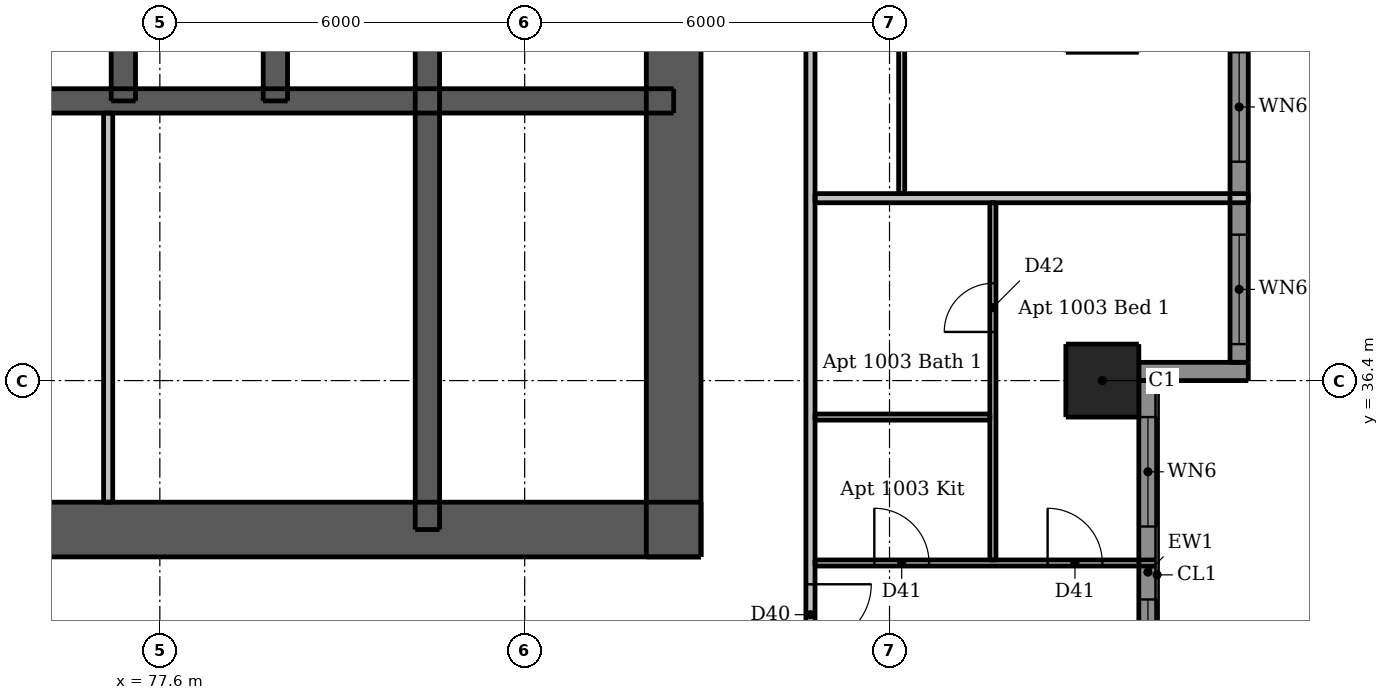
"""IFC4 building model, lengths in metres.
Left out: names, types, materials, properties, quantities, classifications, styles, units other than length and angle.
Written with IfcOpenShell. Run it as: python <this file> out.ifc"""

import sys

from ifc_helpers import new_model, si_unit, direction, frame, frame_2d, origin, origin_2d, place, context, subcontext, project, spatial, rectangle, extrude, element, fill, save


model = new_model("IFC4")
c1 = context("Model", 3, precision=1e-05, world=origin(), true_north=direction((0.0, 1.0)))
c2 = subcontext(c1, "Body", "Model", "MODEL_VIEW")
j1 = project(units=[si_unit("LENGTHUNIT", "METRE"), si_unit("PLANEANGLEUNIT", "RADIAN")], contexts=[c1])
p1 = place(None, origin())
s1 = spatial("IfcSite", under=j1, at=p1, CompositionType="ELEMENT")
p2 = place(p1, origin())
s2 = spatial("IfcBuilding", under=s1, at=p2, CompositionType="ELEMENT")
p3 = place(p2, frame((0.0, 0.0, 40.0)))
s3 = spatial("IfcBuildingStorey", under=s2, at=p3, CompositionType="ELEMENT", Elevation=40.0)
p4 = place(p3, frame((62.5, 33.95, 0.0), z_axis=(0.0, 0.0, 1.0), x_axis=(1.0, 0.0, 0.0)))
e1 = element("IfcWall", 1, at=p4, inside=s3, PredefinedType="SHEAR", context=c2, shape_type="SweptSolid", body=[
    extrude(rectangle(XDim=24.0, YDim=0.9, at=frame_2d((12.0, 0.0))), origin(), (0.0, 0.0, 1.0), 3.05),
])
p5 = place(p4, frame((2.05, 0.0, 0.0)))
e2 = element("IfcOpeningElement", 2, at=p5, cuts=e1, PredefinedType="OPENING", context=c2, shape_type="SweptSolid", body=[
    extrude(rectangle(XDim=1.1, YDim=2.1, at=frame_2d((0.55, 1.05))), frame((0.0, 0.46, 0.0), z_axis=(0.0, -1.0, 0.0), x_axis=(1.0, 0.0, 0.0)), (0.0, 0.0, 1.0), 0.92),
])
p6 = place(p4, frame((20.85, 0.0, 0.0)))
e3 = element("IfcOpeningElement", 3, at=p6, cuts=e1, PredefinedType="OPENING", context=c2, shape_type="SweptSolid", body=[
    extrude(rectangle(XDim=1.1, YDim=2.1, at=frame_2d((0.55, 1.05))), frame((0.0, 0.46, 0.0), z_axis=(0.0, -1.0, 0.0), x_axis=(1.0, 0.0, 0.0)), (0.0, 0.0, 1.0), 0.92),
])
p7 = place(p4, frame((8.0, 0.0, 0.0)))
e4 = element("IfcOpeningElement", 4, at=p7, cuts=e1, PredefinedType="OPENING", context=c2, shape_type="SweptSolid", body=[
    extrude(rectangle(XDim=1.1, YDim=2.1, at=frame_2d((0.55, 1.05))), frame((0.0, 0.46, 0.0), z_axis=(0.0, -1.0, 0.0), x_axis=(1.0, 0.0, 0.0)), (0.0, 0.0, 1.0), 0.92),
])
p8 = place(p4, frame((16.363, 0.0, 0.0)))
e5 = element("IfcOpeningElement", 5, at=p8, cuts=e1, PredefinedType="OPENING", context=c2, shape_type="SweptSolid", body=[
    extrude(rectangle(XDim=0.9, YDim=2.1, at=frame_2d((0.45, 1.05))), frame((0.0, 0.46, 0.0), z_axis=(0.0, -1.0, 0.0), x_axis=(1.0, 0.0, 0.0)), (0.0, 0.0, 1.0), 0.92),
])
p9 = place(p3, frame((86.05, 33.5, 0.0), z_axis=(0.0, 0.0, 1.0), x_axis=(0.0, 1.0, 0.0)))
e6 = element("IfcWall", 6, at=p9, inside=s3, PredefinedType="SHEAR", context=c2, shape_type="SweptSolid", body=[
    extrude(rectangle(XDim=24.0, YDim=0.9, at=frame_2d((12.0, 0.0))), origin(), (0.0, 0.0, 1.0), 3.05),
])
p10 = place(p9, frame((11.2, 0.0, 0.0)))
e7 = element("IfcOpeningElement", 7, at=p10, cuts=e6, PredefinedType="OPENING", context=c2, shape_type="SweptSolid", body=[
    extrude(rectangle(XDim=1.6, YDim=2.1, at=frame_2d((0.8, 1.05))), frame((0.0, 0.46, 0.0), z_axis=(0.0, -1.0, 0.0), x_axis=(1.0, 0.0, 0.0)), (0.0, 0.0, 1.0), 0.92),
])
p11 = place(p3, frame((62.95, 41.0, 0.0), z_axis=(0.0, 0.0, 1.0), x_axis=(1.0, 0.0, 0.0)))
e8 = element("IfcWall", 8, at=p11, inside=s3, PredefinedType="SHEAR", context=c2, shape_type="SweptSolid", body=[
    extrude(rectangle(XDim=23.1, YDim=0.4, at=frame_2d((11.55, 0.0))), origin(), (0.0, 0.0, 1.0), 3.05),
])
p12 = place(p3, frame((82.0, 33.95, 0.0), z_axis=(0.0, 0.0, 1.0), x_axis=(0.0, 1.0, 0.0)))
e9 = element("IfcWall", 9, at=p12, inside=s3, PredefinedType="SHEAR", context=c2, shape_type="SweptSolid", body=[
    extrude(rectangle(XDim=9.95, YDim=0.4, at=frame_2d((4.975, 0.0))), origin(), (0.0, 0.0, 1.0), 3.05),
])
for number, where, z_axis, x_axis in (
    (10, (77.0, 41.0, 0.0), (0.0, 0.0, 1.0), (0.0, 1.0, 0.0)),
    (11, (79.5, 41.0, 0.0), (0.0, 0.0, 1.0), (0.0, 1.0, 0.0)),
):
    element("IfcWall", number, at=place(p3, frame(where, z_axis=z_axis, x_axis=x_axis)), inside=s3, PredefinedType="SHEAR", context=c2, shape_type="SweptSolid", body=[
        extrude(rectangle(XDim=2.9, YDim=0.4, at=frame_2d((1.45, 0.0))), origin(), (0.0, 0.0, 1.0), 3.05),
    ])
for number, where, z_axis, x_axis in (
    (12, (93.1, 36.4, 0.0), (0.0, 0.0, 1.0), (1.0, 0.0, 0.0)),
    (13, (93.1, 42.4, 0.0), (0.0, 0.0, 1.0), (1.0, 0.0, 0.0)),
):
    element("IfcColumn", number, at=place(p3, frame(where, z_axis=z_axis, x_axis=x_axis)), inside=s3, PredefinedType="COLUMN", context=c2, shape_type="SweptSolid", body=[
        extrude(rectangle(XDim=1.2, YDim=1.2, at=origin_2d()), origin(), (0.0, 0.0, 1.0), 3.05),
    ])
p13 = place(p3, frame((93.7, 36.55, 0.0), z_axis=(0.0, 0.0, 1.0), x_axis=(1.0, 0.0, 0.0)))
e14 = element("IfcWall", 14, at=p13, inside=s3, PredefinedType="SOLIDWALL", context=c2, shape_type="SweptSolid", body=[
    extrude(rectangle(XDim=1.8, YDim=0.3, at=frame_2d((0.9, 0.0))), origin(), (0.0, 0.0, 1.0), 3.05),
])
p14 = place(p3, frame((93.85, 30.1, 0.0), z_axis=(0.0, 0.0, 1.0), x_axis=(0.0, 1.0, 0.0)))
e15 = element("IfcWall", 15, at=p14, inside=s3, PredefinedType="SOLIDWALL", context=c2, shape_type="SweptSolid", body=[
    extrude(rectangle(XDim=6.3, YDim=0.3, at=frame_2d((3.15, 0.0))), origin(), (0.0, 0.0, 1.0), 3.05),
])
p15 = place(p14, frame((0.9, 0.0, 0.15)))
e16 = element("IfcOpeningElement", 16, at=p15, cuts=e15, PredefinedType="OPENING", context=c2, shape_type="SweptSolid", body=[
    extrude(rectangle(XDim=1.8, YDim=2.1, at=frame_2d((0.9, 1.05))), frame((0.0, 0.16, 0.0), z_axis=(0.0, -1.0, 0.0), x_axis=(1.0, 0.0, 0.0)), (0.0, 0.0, 1.0), 0.32),
])
p16 = place(p14, frame((3.9, 0.0, 0.15)))
e17 = element("IfcOpeningElement", 17, at=p16, cuts=e15, PredefinedType="OPENING", context=c2, shape_type="SweptSolid", body=[
    extrude(rectangle(XDim=1.8, YDim=2.1, at=frame_2d((0.9, 1.05))), frame((0.0, 0.16, 0.0), z_axis=(0.0, -1.0, 0.0), x_axis=(1.0, 0.0, 0.0)), (0.0, 0.0, 1.0), 0.32),
])
p17 = place(p3, frame((95.35, 36.7, 0.0), z_axis=(0.0, 0.0, 1.0), x_axis=(0.0, 1.0, 0.0)))
e18 = element("IfcWall", 18, at=p17, inside=s3, PredefinedType="SOLIDWALL", context=c2, shape_type="SweptSolid", body=[
    extrude(rectangle(XDim=5.61, YDim=0.3, at=frame_2d((2.805, 0.0))), origin(), (0.0, 0.0, 1.0), 3.05),
])
p18 = place(p17, frame((0.3, 0.0, 0.15)))
e19 = element("IfcOpeningElement", 19, at=p18, cuts=e18, PredefinedType="OPENING", context=c2, shape_type="SweptSolid", body=[
    extrude(rectangle(XDim=1.8, YDim=2.1, at=frame_2d((0.9, 1.05))), frame((0.0, 0.16, 0.0), z_axis=(0.0, -1.0, 0.0), x_axis=(1.0, 0.0, 0.0)), (0.0, 0.0, 1.0), 0.32),
])
p19 = place(p17, frame((3.3, 0.0, 0.15)))
e20 = element("IfcOpeningElement", 20, at=p19, cuts=e18, PredefinedType="OPENING", context=c2, shape_type="SweptSolid", body=[
    extrude(rectangle(XDim=1.8, YDim=2.1, at=frame_2d((0.9, 1.05))), frame((0.0, 0.16, 0.0), z_axis=(0.0, -1.0, 0.0), x_axis=(1.0, 0.0, 0.0)), (0.0, 0.0, 1.0), 0.32),
])
p20 = place(p3, frame((76.75, 34.4, 0.0), z_axis=(0.0, 0.0, 1.0), x_axis=(0.0, 1.0, 0.0)))
e21 = element("IfcWall", 21, at=p20, inside=s3, PredefinedType="PLUMBINGWALL", context=c2, shape_type="SweptSolid", body=[
    extrude(rectangle(XDim=6.4, YDim=0.15, at=frame_2d((3.2, 0.0))), origin(), (0.0, 0.0, 1.0), 3.05),
])
p21 = place(p3, frame((89.8, 59.35, 0.0), z_axis=(0.0, 0.0, 1.0), x_axis=(0.0, -1.0, 0.0)))
e22 = element("IfcWall", 22, at=p21, inside=s3, PredefinedType="PARTITIONING", context=c2, shape_type="SweptSolid", body=[
    extrude(rectangle(XDim=19.875, YDim=0.1, at=frame_2d((9.938, 0.0))), origin(), (0.0, 0.0, 1.0), 3.05),
])
p22 = place(p21, frame((15.0, 0.0, 0.0)))
e23 = element("IfcOpeningElement", 23, at=p22, cuts=e22, PredefinedType="OPENING", context=c2, shape_type="SweptSolid", body=[
    extrude(rectangle(XDim=0.9, YDim=2.1, at=frame_2d((0.45, 1.05))), frame((0.0, 0.06, 0.0), z_axis=(0.0, -1.0, 0.0), x_axis=(1.0, 0.0, 0.0)), (0.0, 0.0, 1.0), 0.12),
])
p23 = place(p21, frame((9.0, 0.0, 0.0)))
e24 = element("IfcOpeningElement", 24, at=p23, cuts=e22, PredefinedType="OPENING", context=c2, shape_type="SweptSolid", body=[
    extrude(rectangle(XDim=0.9, YDim=2.1, at=frame_2d((0.45, 1.05))), frame((0.0, 0.06, 0.0), z_axis=(0.0, -1.0, 0.0), x_axis=(1.0, 0.0, 0.0)), (0.0, 0.0, 1.0), 0.12),
])
p24 = place(p21, frame((6.0, 0.0, 0.0)))
e25 = element("IfcOpeningElement", 25, at=p24, cuts=e22, PredefinedType="OPENING", context=c2, shape_type="SweptSolid", body=[
    extrude(rectangle(XDim=0.9, YDim=2.1, at=frame_2d((0.45, 1.05))), frame((0.0, 0.06, 0.0), z_axis=(0.0, -1.0, 0.0), x_axis=(1.0, 0.0, 0.0)), (0.0, 0.0, 1.0), 0.12),
])
p25 = place(p21, frame((0.85, 0.0, 0.0)))
e26 = element("IfcOpeningElement", 26, at=p25, cuts=e22, PredefinedType="OPENING", context=c2, shape_type="SweptSolid", body=[
    extrude(rectangle(XDim=0.9, YDim=2.1, at=frame_2d((0.45, 1.05))), frame((0.0, 0.06, 0.0), z_axis=(0.0, -1.0, 0.0), x_axis=(1.0, 0.0, 0.0)), (0.0, 0.0, 1.0), 0.12),
])
p26 = place(p21, frame((3.35, 0.0, 0.0)))
e27 = element("IfcOpeningElement", 27, at=p26, cuts=e22, PredefinedType="OPENING", context=c2, shape_type="SweptSolid", body=[
    extrude(rectangle(XDim=0.8, YDim=2.1, at=frame_2d((0.4, 1.05))), frame((0.0, 0.06, 0.0), z_axis=(0.0, -1.0, 0.0), x_axis=(1.0, 0.0, 0.0)), (0.0, 0.0, 1.0), 0.12),
])
p27 = place(p3, frame((91.3, 33.45, 0.0), z_axis=(0.0, 0.0, 1.0), x_axis=(0.0, 1.0, 0.0)))
e28 = element("IfcWall", 28, at=p27, inside=s3, PredefinedType="PARTITIONING", context=c2, shape_type="SweptSolid", body=[
    extrude(rectangle(XDim=5.875, YDim=0.1, at=frame_2d((2.938, 0.0))), origin(), (0.0, 0.0, 1.0), 3.05),
])
p28 = place(p27, frame((3.75, 0.0, 0.0)))
e29 = element("IfcOpeningElement", 29, at=p28, cuts=e28, PredefinedType="OPENING", context=c2, shape_type="SweptSolid", body=[
    extrude(rectangle(XDim=0.8, YDim=2.1, at=frame_2d((0.4, 1.05))), frame((0.0, 0.06, 0.0), z_axis=(0.0, -1.0, 0.0), x_axis=(1.0, 0.0, 0.0)), (0.0, 0.0, 1.0), 0.12),
])
p29 = place(p3, frame((88.375, 35.8, 0.0), z_axis=(0.0, 0.0, 1.0), x_axis=(1.0, 0.0, 0.0)))
e30 = element("IfcWall", 30, at=p29, inside=s3, PredefinedType="PARTITIONING", context=c2, shape_type="SweptSolid", body=[
    extrude(rectangle(XDim=2.875, YDim=0.1, at=frame_2d((1.438, 0.0))), origin(), (0.0, 0.0, 1.0), 3.05),
])
p30 = place(p3, frame((88.375, 33.4, 0.0), z_axis=(0.0, 0.0, 1.0), x_axis=(1.0, 0.0, 0.0)))
e31 = element("IfcWall", 31, at=p30, inside=s3, PredefinedType="PARTITIONING", context=c2, shape_type="SweptSolid", body=[
    extrude(rectangle(XDim=5.625, YDim=0.1, at=frame_2d((2.812, 0.0))), origin(), (0.0, 0.0, 1.0), 3.05),
])
p31 = place(p30, frame((0.975, 0.0, 0.0)))
e32 = element("IfcOpeningElement", 32, at=p31, cuts=e31, PredefinedType="OPENING", context=c2, shape_type="SweptSolid", body=[
    extrude(rectangle(XDim=0.9, YDim=2.1, at=frame_2d((0.45, 1.05))), frame((0.0, 0.06, 0.0), z_axis=(0.0, -1.0, 0.0), x_axis=(1.0, 0.0, 0.0)), (0.0, 0.0, 1.0), 0.12),
])
p32 = place(p30, frame((3.825, 0.0, 0.0)))
e33 = element("IfcOpeningElement", 33, at=p32, cuts=e31, PredefinedType="OPENING", context=c2, shape_type="SweptSolid", body=[
    extrude(rectangle(XDim=0.9, YDim=2.1, at=frame_2d((0.45, 1.05))), frame((0.0, 0.06, 0.0), z_axis=(0.0, -1.0, 0.0), x_axis=(1.0, 0.0, 0.0)), (0.0, 0.0, 1.0), 0.12),
])
p33 = place(p3, frame((88.3, 60.475, 0.0), z_axis=(0.0, 0.0, 1.0), x_axis=(0.0, -1.0, 0.0)))
e34 = element("IfcWall", 34, at=p33, inside=s3, PredefinedType="PARTITIONING", context=c2, shape_type="SweptSolid", body=[
    extrude(rectangle(XDim=28.7, YDim=0.15, at=frame_2d((14.35, 0.0))), origin(), (0.0, 0.0, 1.0), 3.05),
])
p34 = place(p33, frame((27.425, 0.0, 0.0)))
e35 = element("IfcOpeningElement", 35, at=p34, cuts=e34, PredefinedType="OPENING", context=c2, shape_type="SweptSolid", body=[
    extrude(rectangle(XDim=1.0, YDim=2.1, at=frame_2d((0.5, 1.05))), frame((0.0, 0.085, 0.0), z_axis=(0.0, -1.0, 0.0), x_axis=(1.0, 0.0, 0.0)), (0.0, 0.0, 1.0), 0.17),
])
p35 = place(p33, frame((10.625, 0.0, 0.0)))
e36 = element("IfcOpeningElement", 36, at=p35, cuts=e34, PredefinedType="OPENING", context=c2, shape_type="SweptSolid", body=[
    extrude(rectangle(XDim=1.0, YDim=2.1, at=frame_2d((0.5, 1.05))), frame((0.0, 0.085, 0.0), z_axis=(0.0, -1.0, 0.0), x_axis=(1.0, 0.0, 0.0)), (0.0, 0.0, 1.0), 0.17),
])
p36 = place(p3, frame((88.375, 39.4, 0.0), z_axis=(0.0, 0.0, 1.0), x_axis=(1.0, 0.0, 0.0)))
e37 = element("IfcWall", 37, at=p36, inside=s3, PredefinedType="PARTITIONING", context=c2, shape_type="SweptSolid", body=[
    extrude(rectangle(XDim=7.125, YDim=0.15, at=frame_2d((3.562, 0.0))), origin(), (0.0, 0.0, 1.0), 3.05),
])
p37 = place(p15, origin())
e38 = element("IfcWindow", 38, at=p37, inside=s3, PartitioningType="DOUBLE_PANEL_VERTICAL", PredefinedType="WINDOW", context=c2, shape_type="SweptSolid", body=[
    extrude(rectangle(XDim=1.8, YDim=2.1, at=frame_2d((0.9, 1.05))), frame((0.0, 0.03, 0.0), z_axis=(0.0, -1.0, 0.0), x_axis=(1.0, 0.0, 0.0)), (0.0, 0.0, 1.0), 0.06),
])
fill(e16, e38)
p38 = place(p16, origin())
e39 = element("IfcWindow", 39, at=p38, inside=s3, PartitioningType="DOUBLE_PANEL_VERTICAL", PredefinedType="WINDOW", context=c2, shape_type="SweptSolid", body=[
    extrude(rectangle(XDim=1.8, YDim=2.1, at=frame_2d((0.9, 1.05))), frame((0.0, 0.03, 0.0), z_axis=(0.0, -1.0, 0.0), x_axis=(1.0, 0.0, 0.0)), (0.0, 0.0, 1.0), 0.06),
])
fill(e17, e39)
p39 = place(p18, origin())
e40 = element("IfcWindow", 40, at=p39, inside=s3, PartitioningType="DOUBLE_PANEL_VERTICAL", PredefinedType="WINDOW", context=c2, shape_type="SweptSolid", body=[
    extrude(rectangle(XDim=1.8, YDim=2.1, at=frame_2d((0.9, 1.05))), frame((0.0, 0.03, 0.0), z_axis=(0.0, -1.0, 0.0), x_axis=(1.0, 0.0, 0.0)), (0.0, 0.0, 1.0), 0.06),
])
fill(e19, e40)
p40 = place(p19, origin())
e41 = element("IfcWindow", 41, at=p40, inside=s3, PartitioningType="DOUBLE_PANEL_VERTICAL", PredefinedType="WINDOW", context=c2, shape_type="SweptSolid", body=[
    extrude(rectangle(XDim=1.8, YDim=2.1, at=frame_2d((0.9, 1.05))), frame((0.0, 0.03, 0.0), z_axis=(0.0, -1.0, 0.0), x_axis=(1.0, 0.0, 0.0)), (0.0, 0.0, 1.0), 0.06),
])
fill(e20, e41)
p41 = place(p6, origin())
e42 = element("IfcDoor", 42, at=p41, inside=s3, OperationType="SINGLE_SWING_RIGHT", PredefinedType="DOOR", context=c2, shape_type="SweptSolid", body=[
    extrude(rectangle(XDim=1.1, YDim=2.1, at=frame_2d((0.55, 1.05))), frame((0.0, 0.438, 0.0), z_axis=(0.0, -1.0, 0.0), x_axis=(1.0, 0.0, 0.0)), (0.0, 0.0, 1.0), 0.05),
])
fill(e3, e42)
p42 = place(p8, origin())
e43 = element("IfcDoor", 43, at=p42, inside=s3, OperationType="SINGLE_SWING_LEFT", PredefinedType="DOOR", context=c2, shape_type="SweptSolid", body=[
    extrude(rectangle(XDim=0.9, YDim=2.1, at=frame_2d((0.45, 1.05))), frame((0.0, 0.438, 0.0), z_axis=(0.0, -1.0, 0.0), x_axis=(1.0, 0.0, 0.0)), (0.0, 0.0, 1.0), 0.05),
])
fill(e5, e43)
p43 = place(p34, origin())
e44 = element("IfcDoor", 44, at=p43, inside=s3, OperationType="SINGLE_SWING_LEFT", PredefinedType="DOOR", context=c2, shape_type="SweptSolid", body=[
    extrude(rectangle(XDim=1.0, YDim=2.1, at=frame_2d((0.5, 1.05))), frame((0.0, 0.025, 0.0), z_axis=(0.0, -1.0, 0.0), x_axis=(1.0, 0.0, 0.0)), (0.0, 0.0, 1.0), 0.05),
])
fill(e35, e44)
p44 = place(p31, origin())
e45 = element("IfcDoor", 45, at=p44, inside=s3, OperationType="SINGLE_SWING_LEFT", PredefinedType="DOOR", context=c2, shape_type="SweptSolid", body=[
    extrude(rectangle(XDim=0.9, YDim=2.1, at=frame_2d((0.45, 1.05))), frame((0.0, 0.025, 0.0), z_axis=(0.0, -1.0, 0.0), x_axis=(1.0, 0.0, 0.0)), (0.0, 0.0, 1.0), 0.05),
])
fill(e32, e45)
p45 = place(p32, origin())
e46 = element("IfcDoor", 46, at=p45, inside=s3, OperationType="SINGLE_SWING_LEFT", PredefinedType="DOOR", context=c2, shape_type="SweptSolid", body=[
    extrude(rectangle(XDim=0.9, YDim=2.1, at=frame_2d((0.45, 1.05))), frame((0.0, 0.025, 0.0), z_axis=(0.0, -1.0, 0.0), x_axis=(1.0, 0.0, 0.0)), (0.0, 0.0, 1.0), 0.05),
])
fill(e33, e46)
p46 = place(p28, origin())
e47 = element("IfcDoor", 47, at=p46, inside=s3, OperationType="SINGLE_SWING_LEFT", PredefinedType="DOOR", context=c2, shape_type="SweptSolid", body=[
    extrude(rectangle(XDim=0.8, YDim=2.1, at=frame_2d((0.4, 1.05))), frame((0.0, 0.025, 0.0), z_axis=(0.0, -1.0, 0.0), x_axis=(1.0, 0.0, 0.0)), (0.0, 0.0, 1.0), 0.05),
])
fill(e29, e47)
save(model, sys.argv[1])
